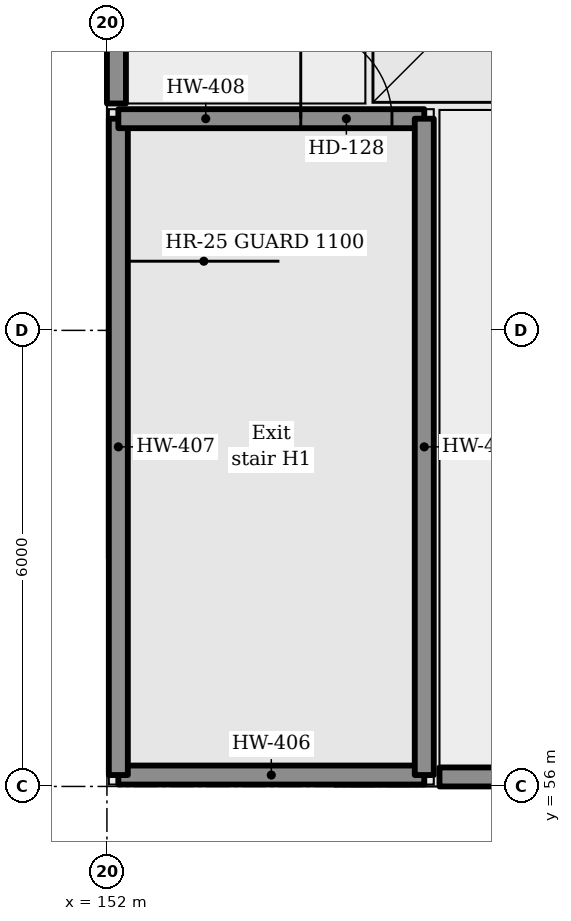
"""IFC4 building model, lengths in metres.
Left out: names, types, materials, properties, quantities, classifications, styles, units other than length and angle.
Written with IfcOpenShell. Run it as: python <this file> out.ifc"""

import sys

from ifc_helpers import new_model, si_unit, direction, frame, frame_2d, origin, origin_2d, place, context, subcontext, project, spatial, rectangle, extrude, element, fill, save


model = new_model("IFC4")
c1 = context("Model", 3, precision=1e-05, world=origin(), true_north=direction((0.0, 1.0)))
c2 = subcontext(c1, "Body", "Model", "MODEL_VIEW")
j1 = project(units=[si_unit("LENGTHUNIT", "METRE"), si_unit("PLANEANGLEUNIT", "RADIAN")], contexts=[c1])
p1 = place(None, origin())
s1 = spatial("IfcSite", under=j1, at=p1, CompositionType="ELEMENT")
p2 = place(p1, origin())
s2 = spatial("IfcBuilding", under=s1, at=p2, CompositionType="ELEMENT")
p3 = place(p2, frame((0.0, 0.0, 19.8)))
s3 = spatial("IfcBuildingStorey", under=s2, at=p3, CompositionType="ELEMENT", Elevation=19.8)
p4 = place(p3, frame((152.125, 64.985, 0.0), z_axis=(0.0, 0.0, 1.0), x_axis=(0.0, 1.0, 0.0)))
e1 = element("IfcWall", 1, at=p4, inside=s3, PredefinedType="PARAPET", context=c2, shape_type="SweptSolid", body=[
    extrude(rectangle(XDim=30.03, YDim=0.25, at=frame_2d((15.015, 0.0))), origin(), (0.0, 0.0, 1.0), 1.1),
])
p5 = place(p3, frame((213.625, 56.125, 0.0), z_axis=(0.0, 0.0, 1.0), x_axis=(-1.0, 0.0, 0.0)))
e2 = element("IfcWall", 2, at=p5, inside=s3, PredefinedType="PARAPET", context=c2, shape_type="SweptSolid", body=[
    extrude(rectangle(XDim=57.25, YDim=0.25, at=frame_2d((28.625, 0.0))), origin(), (0.0, 0.0, 1.0), 1.1),
])
p6 = place(p3, frame((156.175, 56.15, 0.0), z_axis=(0.0, 0.0, 1.0), x_axis=(-1.0, 0.0, 0.0)))
e3 = element("IfcWall", 3, at=p6, inside=s3, PredefinedType="SOLIDWALL", context=c2, shape_type="SweptSolid", body=[
    extrude(rectangle(XDim=4.025, YDim=0.25, at=frame_2d((2.013, 0.0))), origin(), (0.0, 0.0, 1.0), 2.75),
])
p7 = place(p3, frame((152.15, 56.15, 0.0), z_axis=(0.0, 0.0, 1.0), x_axis=(0.0, 1.0, 0.0)))
e4 = element("IfcWall", 4, at=p7, inside=s3, PredefinedType="SOLIDWALL", context=c2, shape_type="SweptSolid", body=[
    extrude(rectangle(XDim=8.635, YDim=0.25, at=frame_2d((4.317, 0.0))), origin(), (0.0, 0.0, 1.0), 2.75),
])
p8 = place(p3, frame((152.15, 64.785, 0.0), z_axis=(0.0, 0.0, 1.0), x_axis=(1.0, 0.0, 0.0)))
e5 = element("IfcWall", 5, at=p8, inside=s3, PredefinedType="SOLIDWALL", context=c2, shape_type="SweptSolid", body=[
    extrude(rectangle(XDim=4.025, YDim=0.25, at=frame_2d((2.013, 0.0))), origin(), (0.0, 0.0, 1.0), 2.75),
])
p9 = place(p8, frame((2.4, 0.0, 0.0)))
e6 = element("IfcOpeningElement", 6, at=p9, cuts=e5, PredefinedType="OPENING", context=c2, shape_type="SweptSolid", body=[
    extrude(rectangle(XDim=1.2, YDim=2.1, at=frame_2d((0.6, 1.05))), frame((0.0, 0.135, 0.0), z_axis=(0.0, -1.0, 0.0), x_axis=(1.0, 0.0, 0.0)), (0.0, 0.0, 1.0), 0.27),
])
p10 = place(p3, frame((156.175, 64.785, 0.0), z_axis=(0.0, 0.0, 1.0), x_axis=(0.0, -1.0, 0.0)))
e7 = element("IfcWall", 7, at=p10, inside=s3, PredefinedType="SOLIDWALL", context=c2, shape_type="SweptSolid", body=[
    extrude(rectangle(XDim=8.635, YDim=0.25, at=frame_2d((4.317, 0.0))), origin(), (0.0, 0.0, 1.0), 2.75),
])
p11 = place(p3, frame((0.0, 0.0, -0.35)))
p12 = place(p11, frame((156.5, 66.0, 0.0)))
p13 = place(p12, frame((0.0, 0.0, 0.3)))
e8 = element("IfcWindow", 8, at=p13, inside=s3, PartitioningType="SINGLE_PANEL", PredefinedType="SKYLIGHT", context=c2, shape_type="SweptSolid", body=[
    extrude(rectangle(XDim=2.0, YDim=2.0, at=origin_2d()), origin(), (0.0, 0.0, 1.0), 0.05),
])
p14 = place(p9, frame((1.2, 0.0, 0.0), z_axis=(0.0, 0.0, 1.0), x_axis=(-1.0, 0.0, 0.0)))
e9 = element("IfcDoor", 9, at=p14, inside=s3, OperationType="SINGLE_SWING_LEFT", PredefinedType="DOOR", context=c2, shape_type="SweptSolid", body=[
    extrude(rectangle(XDim=1.2, YDim=2.1, at=frame_2d((0.6, 1.05))), frame((0.0, 0.025, 0.0), z_axis=(0.0, -1.0, 0.0), x_axis=(1.0, 0.0, 0.0)), (0.0, 0.0, 1.0), 0.05),
])
fill(e6, e9)
save(model, sys.argv[1])
